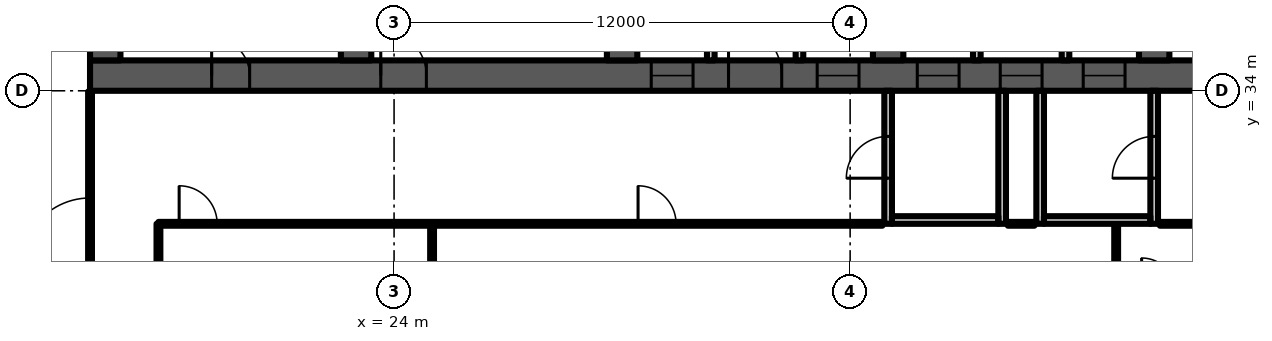
"""IFC4 building model, lengths in metres.
Left out: names, types, materials, properties, quantities, classifications, styles, units other than length and angle.
Written with IfcOpenShell. Run it as: python <this file> out.ifc"""

import sys

from ifc_helpers import new_model, si_unit, direction, frame, frame_2d, origin, place, context, subcontext, project, spatial, polyline, rectangle, outline, extrude, element, fill, save


model = new_model("IFC4")
c1 = context("Model", 3, precision=1e-05, world=origin(), true_north=direction((0.0, 1.0)))
c2 = subcontext(c1, "Body", "Model", "MODEL_VIEW")
j1 = project(units=[si_unit("LENGTHUNIT", "METRE"), si_unit("PLANEANGLEUNIT", "RADIAN")], contexts=[c1])
p1 = place(None, origin())
s1 = spatial("IfcSite", under=j1, at=p1, CompositionType="ELEMENT")
p2 = place(p1, origin())
s2 = spatial("IfcBuilding", under=s1, at=p2, CompositionType="ELEMENT")
p3 = place(p2, frame((0.0, 0.0, 151.9)))
s3 = spatial("IfcBuildingStorey", under=s2, at=p3, CompositionType="ELEMENT", Elevation=151.9)
p4 = place(p3, frame((16.0, 34.4, 0.0), z_axis=(0.0, 0.0, 1.0), x_axis=(1.0, 0.0, 0.0)))
e1 = element("IfcWall", 1, at=p4, inside=s3, PredefinedType="SHEAR", context=c2, shape_type="SweptSolid", body=[
    extrude(rectangle(XDim=42.0, YDim=0.8, at=frame_2d((21.0, 0.0))), origin(), (0.0, 0.0, 1.0), 3.6),
])
p5 = place(p4, frame((3.2, 0.0, 0.0)))
e2 = element("IfcOpeningElement", 2, at=p5, cuts=e1, PredefinedType="OPENING", context=c2, shape_type="SweptSolid", body=[
    extrude(rectangle(XDim=1.0, YDim=2.1, at=frame_2d((0.5, 1.05))), frame((0.0, 0.41, 0.0), z_axis=(0.0, -1.0, 0.0), x_axis=(1.0, 0.0, 0.0)), (0.0, 0.0, 1.0), 0.82),
])
p6 = place(p4, frame((7.65, 0.0, 0.0)))
e3 = element("IfcOpeningElement", 3, at=p6, cuts=e1, PredefinedType="OPENING", context=c2, shape_type="SweptSolid", body=[
    extrude(rectangle(XDim=1.2, YDim=2.1, at=frame_2d((0.6, 1.05))), frame((0.0, 0.41, 0.0), z_axis=(0.0, -1.0, 0.0), x_axis=(1.0, 0.0, 0.0)), (0.0, 0.0, 1.0), 0.82),
])
p7 = place(p4, frame((14.767, 0.0, 0.0)))
e4 = element("IfcOpeningElement", 4, at=p7, cuts=e1, PredefinedType="OPENING", context=c2, shape_type="SweptSolid", body=[
    extrude(rectangle(XDim=1.1, YDim=2.1, at=frame_2d((0.55, 1.05))), frame((0.0, 0.41, 0.0), z_axis=(0.0, -1.0, 0.0), x_axis=(1.0, 0.0, 0.0)), (0.0, 0.0, 1.0), 0.82),
])
p8 = place(p4, frame((19.133, 0.0, 0.0)))
e5 = element("IfcOpeningElement", 5, at=p8, cuts=e1, PredefinedType="OPENING", context=c2, shape_type="SweptSolid", body=[
    extrude(rectangle(XDim=1.1, YDim=2.1, at=frame_2d((0.55, 1.05))), frame((0.0, 0.41, 0.0), z_axis=(0.0, -1.0, 0.0), x_axis=(1.0, 0.0, 0.0)), (0.0, 0.0, 1.0), 0.82),
])
p9 = place(p4, frame((16.8, 0.0, 0.0)))
e6 = element("IfcOpeningElement", 6, at=p9, cuts=e1, PredefinedType="OPENING", context=c2, shape_type="SweptSolid", body=[
    extrude(rectangle(XDim=1.4, YDim=2.1, at=frame_2d((0.7, 1.05))), frame((0.0, 0.41, 0.0), z_axis=(0.0, -1.0, 0.0), x_axis=(1.0, 0.0, 0.0)), (0.0, 0.0, 1.0), 0.82),
])
p10 = place(p4, frame((21.767, 0.0, 0.0)))
e7 = element("IfcOpeningElement", 7, at=p10, cuts=e1, PredefinedType="OPENING", context=c2, shape_type="SweptSolid", body=[
    extrude(rectangle(XDim=1.1, YDim=2.1, at=frame_2d((0.55, 1.05))), frame((0.0, 0.41, 0.0), z_axis=(0.0, -1.0, 0.0), x_axis=(1.0, 0.0, 0.0)), (0.0, 0.0, 1.0), 0.82),
])
p11 = place(p4, frame((23.95, 0.0, 0.0)))
e8 = element("IfcOpeningElement", 8, at=p11, cuts=e1, PredefinedType="OPENING", context=c2, shape_type="SweptSolid", body=[
    extrude(rectangle(XDim=1.1, YDim=2.1, at=frame_2d((0.55, 1.05))), frame((0.0, 0.41, 0.0), z_axis=(0.0, -1.0, 0.0), x_axis=(1.0, 0.0, 0.0)), (0.0, 0.0, 1.0), 0.82),
])
p12 = place(p4, frame((26.133, 0.0, 0.0)))
e9 = element("IfcOpeningElement", 9, at=p12, cuts=e1, PredefinedType="OPENING", context=c2, shape_type="SweptSolid", body=[
    extrude(rectangle(XDim=1.1, YDim=2.1, at=frame_2d((0.55, 1.05))), frame((0.0, 0.41, 0.0), z_axis=(0.0, -1.0, 0.0), x_axis=(1.0, 0.0, 0.0)), (0.0, 0.0, 1.0), 0.82),
])
p13 = place(p4, frame((33.15, 0.0, 0.0)))
e10 = element("IfcOpeningElement", 10, at=p13, cuts=e1, PredefinedType="OPENING", context=c2, shape_type="SweptSolid", body=[
    extrude(rectangle(XDim=1.2, YDim=2.1, at=frame_2d((0.6, 1.05))), frame((0.0, 0.41, 0.0), z_axis=(0.0, -1.0, 0.0), x_axis=(1.0, 0.0, 0.0)), (0.0, 0.0, 1.0), 0.82),
])
p14 = place(p4, frame((35.817, 0.0, 0.0)))
e11 = element("IfcOpeningElement", 11, at=p14, cuts=e1, PredefinedType="OPENING", context=c2, shape_type="SweptSolid", body=[
    extrude(rectangle(XDim=1.0, YDim=2.1, at=frame_2d((0.5, 1.05))), frame((0.0, 0.41, 0.0), z_axis=(0.0, -1.0, 0.0), x_axis=(1.0, 0.0, 0.0)), (0.0, 0.0, 1.0), 0.82),
])
p15 = place(p4, frame((39.95, 0.0, 0.0)))
e12 = element("IfcOpeningElement", 12, at=p15, cuts=e1, PredefinedType="OPENING", context=c2, shape_type="SweptSolid", body=[
    extrude(rectangle(XDim=1.0, YDim=2.1, at=frame_2d((0.5, 1.05))), frame((0.0, 0.41, 0.0), z_axis=(0.0, -1.0, 0.0), x_axis=(1.0, 0.0, 0.0)), (0.0, 0.0, 1.0), 0.82),
])
p16 = place(p4, frame((37.767, 0.0, 0.0)))
e13 = element("IfcOpeningElement", 13, at=p16, cuts=e1, PredefinedType="OPENING", context=c2, shape_type="SweptSolid", body=[
    extrude(rectangle(XDim=1.4, YDim=2.1, at=frame_2d((0.7, 1.05))), frame((0.0, 0.41, 0.0), z_axis=(0.0, -1.0, 0.0), x_axis=(1.0, 0.0, 0.0)), (0.0, 0.0, 1.0), 0.82),
])
p17 = place(p3, frame((16.4, 34.8, 0.0), z_axis=(0.0, 0.0, 1.0), x_axis=(0.0, 1.0, 0.0)))
e14 = element("IfcWall", 14, at=p17, inside=s3, PredefinedType="SHEAR", context=c2, shape_type="SweptSolid", body=[
    extrude(rectangle(XDim=13.184, YDim=0.8, at=frame_2d((6.592, 0.0))), origin(), (0.0, 0.0, 1.0), 3.6),
])
p18 = place(p3, frame((23.0, 34.8, 0.0), z_axis=(0.0, 0.0, 1.0), x_axis=(0.0, 1.0, 0.0)))
e15 = element("IfcWall", 15, at=p18, inside=s3, PredefinedType="SHEAR", context=c2, shape_type="SweptSolid", body=[
    extrude(rectangle(XDim=13.762, YDim=0.8, at=frame_2d((6.881, 0.0))), origin(), (0.0, 0.0, 1.0), 3.6),
])
p19 = place(p18, frame((2.55, 0.0, 0.0)))
e16 = element("IfcOpeningElement", 16, at=p19, cuts=e15, PredefinedType="OPENING", context=c2, shape_type="SweptSolid", body=[
    extrude(rectangle(XDim=1.1, YDim=2.1, at=frame_2d((0.55, 1.05))), frame((0.0, 0.41, 0.0), z_axis=(0.0, -1.0, 0.0), x_axis=(1.0, 0.0, 0.0)), (0.0, 0.0, 1.0), 0.82),
])
p20 = place(p18, frame((10.0, 0.0, 0.0)))
e17 = element("IfcOpeningElement", 17, at=p20, cuts=e15, PredefinedType="OPENING", context=c2, shape_type="SweptSolid", body=[
    extrude(rectangle(XDim=1.0, YDim=2.1, at=frame_2d((0.5, 1.05))), frame((0.0, 0.41, 0.0), z_axis=(0.0, -1.0, 0.0), x_axis=(1.0, 0.0, 0.0)), (0.0, 0.0, 1.0), 0.82),
])
p21 = place(p3, frame((30.0, 34.8, 0.0), z_axis=(0.0, 0.0, 1.0), x_axis=(0.0, 1.0, 0.0)))
e18 = element("IfcWall", 18, at=p21, inside=s3, PredefinedType="SHEAR", context=c2, shape_type="SweptSolid", body=[
    extrude(rectangle(XDim=14.374, YDim=0.8, at=frame_2d((7.187, 0.0))), origin(), (0.0, 0.0, 1.0), 3.6),
])
p22 = place(p21, frame((3.6, 0.0, 0.0)))
e19 = element("IfcOpeningElement", 19, at=p22, cuts=e18, PredefinedType="OPENING", context=c2, shape_type="SweptSolid", body=[
    extrude(rectangle(XDim=1.1, YDim=2.1, at=frame_2d((0.55, 1.05))), frame((0.0, 0.41, 0.0), z_axis=(0.0, -1.0, 0.0), x_axis=(1.0, 0.0, 0.0)), (0.0, 0.0, 1.0), 0.82),
])
p23 = place(p3, frame((37.0, 34.8, 0.0), z_axis=(0.0, 0.0, 1.0), x_axis=(0.0, 1.0, 0.0)))
e20 = element("IfcWall", 20, at=p23, inside=s3, PredefinedType="SHEAR", context=c2, shape_type="SweptSolid", body=[
    extrude(rectangle(XDim=14.987, YDim=0.8, at=frame_2d((7.493, 0.0))), origin(), (0.0, 0.0, 1.0), 3.6),
])
p24 = place(p23, frame((11.312, 0.0, 0.0)))
e21 = element("IfcOpeningElement", 21, at=p24, cuts=e20, PredefinedType="OPENING", context=c2, shape_type="SweptSolid", body=[
    extrude(rectangle(XDim=1.0, YDim=2.1, at=frame_2d((0.5, 1.05))), frame((0.0, 0.41, 0.0), z_axis=(0.0, -1.0, 0.0), x_axis=(1.0, 0.0, 0.0)), (0.0, 0.0, 1.0), 0.82),
])
p25 = place(p23, frame((3.6, 0.0, 0.0)))
e22 = element("IfcOpeningElement", 22, at=p25, cuts=e20, PredefinedType="OPENING", context=c2, shape_type="SweptSolid", body=[
    extrude(rectangle(XDim=1.1, YDim=2.1, at=frame_2d((0.55, 1.05))), frame((0.0, 0.41, 0.0), z_axis=(0.0, -1.0, 0.0), x_axis=(1.0, 0.0, 0.0)), (0.0, 0.0, 1.0), 0.82),
])
p26 = place(p3, frame((44.0, 34.8, 0.0), z_axis=(0.0, 0.0, 1.0), x_axis=(0.0, 1.0, 0.0)))
e23 = element("IfcWall", 23, at=p26, inside=s3, PredefinedType="SHEAR", context=c2, shape_type="SweptSolid", body=[
    extrude(rectangle(XDim=14.374, YDim=0.8, at=frame_2d((7.187, 0.0))), origin(), (0.0, 0.0, 1.0), 3.6),
])
p27 = place(p26, frame((11.312, 0.0, 0.0)))
e24 = element("IfcOpeningElement", 24, at=p27, cuts=e23, PredefinedType="OPENING", context=c2, shape_type="SweptSolid", body=[
    extrude(rectangle(XDim=1.0, YDim=2.1, at=frame_2d((0.5, 1.05))), frame((0.0, 0.41, 0.0), z_axis=(0.0, -1.0, 0.0), x_axis=(1.0, 0.0, 0.0)), (0.0, 0.0, 1.0), 0.82),
])
p28 = place(p26, frame((3.6, 0.0, 0.0)))
e25 = element("IfcOpeningElement", 25, at=p28, cuts=e23, PredefinedType="OPENING", context=c2, shape_type="SweptSolid", body=[
    extrude(rectangle(XDim=1.1, YDim=2.1, at=frame_2d((0.55, 1.05))), frame((0.0, 0.41, 0.0), z_axis=(0.0, -1.0, 0.0), x_axis=(1.0, 0.0, 0.0)), (0.0, 0.0, 1.0), 0.82),
])
p29 = place(p3, origin())
e26 = element("IfcWall", 26, at=p29, inside=s3, PredefinedType="PARTITIONING", context=c2, shape_type="SweptSolid", body=[
    extrude(outline(polyline([(32.233, 37.65), (30.4, 37.65), (30.4, 37.85), (32.233, 37.85), (32.433, 37.85), (32.433, 34.8), (32.233, 34.8), (32.233, 37.65)])), origin(), (0.0, 0.0, 1.0), 3.2),
])
p30 = place(p3, origin())
e27 = element("IfcWall", 27, at=p30, inside=s3, PredefinedType="PARTITIONING", context=c2, shape_type="SweptSolid", body=[
    extrude(outline(polyline([(34.567, 37.85), (34.767, 37.85), (36.6, 37.85), (36.6, 37.65), (34.767, 37.65), (34.767, 34.8), (34.567, 34.8), (34.567, 37.85)])), origin(), (0.0, 0.0, 1.0), 3.2),
])
p31 = place(p3, origin())
e28 = element("IfcWall", 28, at=p31, inside=s3, PredefinedType="PARTITIONING", context=c2, shape_type="SweptSolid", body=[
    extrude(outline(polyline([(41.567, 37.1), (39.433, 37.1), (39.433, 34.8), (39.233, 34.8), (39.233, 37.65), (37.4, 37.65), (37.4, 37.85), (39.233, 37.85), (39.433, 37.85), (39.433, 37.3), (41.567, 37.3), (41.567, 37.55), (41.767, 37.55), (43.6, 37.55), (43.6, 37.35), (41.767, 37.35), (41.767, 34.8), (41.567, 34.8), (41.567, 37.1)])), origin(), (0.0, 0.0, 1.0), 3.2),
])
p32 = place(p3, frame((37.0, 30.5, 0.0), z_axis=(0.0, 0.0, 1.0), x_axis=(0.0, 1.0, 0.0)))
e29 = element("IfcWall", 29, at=p32, inside=s3, PredefinedType="PARTITIONING", context=c2, shape_type="SweptSolid", body=[
    extrude(rectangle(XDim=3.5, YDim=0.2, at=frame_2d((1.75, 0.0))), origin(), (0.0, 0.0, 1.0), 3.2),
])
p33 = place(p32, frame((1.2, 0.0, 0.0)))
e30 = element("IfcOpeningElement", 30, at=p33, cuts=e29, PredefinedType="OPENING", context=c2, shape_type="SweptSolid", body=[
    extrude(rectangle(XDim=1.1, YDim=2.1, at=frame_2d((0.55, 1.05))), frame((0.0, 0.11, 0.0), z_axis=(0.0, -1.0, 0.0), x_axis=(1.0, 0.0, 0.0)), (0.0, 0.0, 1.0), 0.22),
])
p34 = place(p3, frame((40.0, 30.5, 0.0), z_axis=(0.0, 0.0, 1.0), x_axis=(0.0, 1.0, 0.0)))
e31 = element("IfcWall", 31, at=p34, inside=s3, PredefinedType="PARTITIONING", context=c2, shape_type="SweptSolid", body=[
    extrude(rectangle(XDim=3.5, YDim=0.2, at=frame_2d((1.75, 0.0))), origin(), (0.0, 0.0, 1.0), 3.2),
])
p35 = place(p3, frame((37.1, 30.6, 0.0), z_axis=(0.0, 0.0, 1.0), x_axis=(1.0, 0.0, 0.0)))
e32 = element("IfcWall", 32, at=p35, inside=s3, PredefinedType="PARTITIONING", context=c2, shape_type="SweptSolid", body=[
    extrude(rectangle(XDim=2.8, YDim=0.2, at=frame_2d((1.4, 0.0))), origin(), (0.0, 0.0, 1.0), 3.2),
])
p36 = place(p3, frame((41.0, 30.5, 0.0), z_axis=(0.0, 0.0, 1.0), x_axis=(0.0, 1.0, 0.0)))
e33 = element("IfcWall", 33, at=p36, inside=s3, PredefinedType="PARTITIONING", context=c2, shape_type="SweptSolid", body=[
    extrude(rectangle(XDim=3.5, YDim=0.2, at=frame_2d((1.75, 0.0))), origin(), (0.0, 0.0, 1.0), 3.2),
])
p37 = place(p3, frame((44.0, 30.5, 0.0), z_axis=(0.0, 0.0, 1.0), x_axis=(0.0, 1.0, 0.0)))
e34 = element("IfcWall", 34, at=p37, inside=s3, PredefinedType="PARTITIONING", context=c2, shape_type="SweptSolid", body=[
    extrude(rectangle(XDim=3.5, YDim=0.2, at=frame_2d((1.75, 0.0))), origin(), (0.0, 0.0, 1.0), 3.2),
])
p38 = place(p37, frame((1.2, 0.0, 0.0)))
e35 = element("IfcOpeningElement", 35, at=p38, cuts=e34, PredefinedType="OPENING", context=c2, shape_type="SweptSolid", body=[
    extrude(rectangle(XDim=1.1, YDim=2.1, at=frame_2d((0.55, 1.05))), frame((0.0, 0.11, 0.0), z_axis=(0.0, -1.0, 0.0), x_axis=(1.0, 0.0, 0.0)), (0.0, 0.0, 1.0), 0.22),
])
p39 = place(p3, frame((41.1, 30.6, 0.0), z_axis=(0.0, 0.0, 1.0), x_axis=(1.0, 0.0, 0.0)))
e36 = element("IfcWall", 36, at=p39, inside=s3, PredefinedType="PARTITIONING", context=c2, shape_type="SweptSolid", body=[
    extrude(rectangle(XDim=2.8, YDim=0.2, at=frame_2d((1.4, 0.0))), origin(), (0.0, 0.0, 1.0), 3.2),
])
p40 = place(p3, frame((16.0, 26.42, 0.0), z_axis=(0.0, 0.0, 1.0), x_axis=(0.0, 1.0, 0.0)))
e37 = element("IfcWall", 37, at=p40, inside=s3, PredefinedType="PARTITIONING", context=c2, shape_type="SweptSolid", body=[
    extrude(rectangle(XDim=7.56, YDim=0.1, at=frame_2d((3.78, 0.0))), origin(), (0.0, 0.0, 1.0), 3.2),
])
p41 = place(p40, frame((2.96, 0.0, 0.0)))
e38 = element("IfcOpeningElement", 38, at=p41, cuts=e37, PredefinedType="OPENING", context=c2, shape_type="SweptSolid", body=[
    extrude(rectangle(XDim=1.8, YDim=2.1, at=frame_2d((0.9, 1.05))), frame((0.0, 0.06, 0.0), z_axis=(0.0, -1.0, 0.0), x_axis=(1.0, 0.0, 0.0)), (0.0, 0.0, 1.0), 0.12),
])
p42 = place(p3, frame((17.8, 24.135, 0.0), z_axis=(0.0, 0.0, 1.0), x_axis=(0.0, 1.0, 0.0)))
e39 = element("IfcWall", 39, at=p42, inside=s3, PredefinedType="PARTITIONING", context=c2, shape_type="SweptSolid", body=[
    extrude(rectangle(XDim=6.365, YDim=0.1, at=frame_2d((3.183, 0.0))), origin(), (0.0, 0.0, 1.0), 3.2),
])
p43 = place(p3, frame((17.8, 30.5, 0.0), z_axis=(0.0, 0.0, 1.0), x_axis=(1.0, 0.0, 0.0)))
e40 = element("IfcWall", 40, at=p43, inside=s3, PredefinedType="PARTITIONING", context=c2, shape_type="SweptSolid", body=[
    extrude(rectangle(XDim=19.05, YDim=0.1, at=frame_2d((9.525, 0.0))), origin(), (0.0, 0.0, 1.0), 3.2),
])
p44 = place(p43, frame((0.545, 0.0, 0.0)))
e41 = element("IfcOpeningElement", 41, at=p44, cuts=e40, PredefinedType="OPENING", context=c2, shape_type="SweptSolid", body=[
    extrude(rectangle(XDim=1.0, YDim=2.1, at=frame_2d((0.5, 1.05))), frame((0.0, 0.06, 0.0), z_axis=(0.0, -1.0, 0.0), x_axis=(1.0, 0.0, 0.0)), (0.0, 0.0, 1.0), 0.12),
])
p45 = place(p43, frame((12.62, 0.0, 0.0)))
e42 = element("IfcOpeningElement", 42, at=p45, cuts=e40, PredefinedType="OPENING", context=c2, shape_type="SweptSolid", body=[
    extrude(rectangle(XDim=1.0, YDim=2.1, at=frame_2d((0.5, 1.05))), frame((0.0, 0.06, 0.0), z_axis=(0.0, -1.0, 0.0), x_axis=(1.0, 0.0, 0.0)), (0.0, 0.0, 1.0), 0.12),
])
p46 = place(p3, frame((25.0, 15.27, 0.0), z_axis=(0.0, 0.0, 1.0), x_axis=(0.0, 1.0, 0.0)))
e43 = element("IfcWall", 43, at=p46, inside=s3, PredefinedType="PARTITIONING", context=c2, shape_type="SweptSolid", body=[
    extrude(rectangle(XDim=15.23, YDim=0.1, at=frame_2d((7.615, 0.0))), origin(), (0.0, 0.0, 1.0), 3.2),
])
p47 = place(p3, frame((43.0, 15.27, 0.0), z_axis=(0.0, 0.0, 1.0), x_axis=(0.0, 1.0, 0.0)))
e44 = element("IfcWall", 44, at=p47, inside=s3, PredefinedType="PARTITIONING", context=c2, shape_type="SweptSolid", body=[
    extrude(rectangle(XDim=15.22, YDim=0.1, at=frame_2d((7.61, 0.0))), origin(), (0.0, 0.0, 1.0), 3.2),
])
p48 = place(p3, frame((40.15, 30.5, 0.0), z_axis=(0.0, 0.0, 1.0), x_axis=(1.0, 0.0, 0.0)))
e45 = element("IfcWall", 45, at=p48, inside=s3, PredefinedType="PARTITIONING", context=c2, shape_type="SweptSolid", body=[
    extrude(rectangle(XDim=0.7, YDim=0.1, at=frame_2d((0.35, 0.0))), origin(), (0.0, 0.0, 1.0), 3.2),
])
p49 = place(p3, frame((44.15, 30.5, 0.0), z_axis=(0.0, 0.0, 1.0), x_axis=(1.0, 0.0, 0.0)))
e46 = element("IfcWall", 46, at=p49, inside=s3, PredefinedType="PARTITIONING", context=c2, shape_type="SweptSolid", body=[
    extrude(rectangle(XDim=12.425, YDim=0.1, at=frame_2d((6.212, 0.0))), origin(), (0.0, 0.0, 1.0), 3.2),
])
p50 = place(p49, frame((11.15, 0.0, 0.0)))
e47 = element("IfcOpeningElement", 47, at=p50, cuts=e46, PredefinedType="OPENING", context=c2, shape_type="SweptSolid", body=[
    extrude(rectangle(XDim=1.0, YDim=2.1, at=frame_2d((0.5, 1.05))), frame((0.0, 0.06, 0.0), z_axis=(0.0, -1.0, 0.0), x_axis=(1.0, 0.0, 0.0)), (0.0, 0.0, 1.0), 0.12),
])
p51 = place(p5, origin())
e48 = element("IfcDoor", 48, at=p51, inside=s3, OperationType="SINGLE_SWING_LEFT", PredefinedType="DOOR", context=c2, shape_type="SweptSolid", body=[
    extrude(rectangle(XDim=1.0, YDim=2.1, at=frame_2d((0.5, 1.05))), frame((0.0, 0.4, 0.0), z_axis=(0.0, -1.0, 0.0), x_axis=(1.0, 0.0, 0.0)), (0.0, 0.0, 1.0), 0.8),
])
fill(e2, e48)
p52 = place(p6, origin())
e49 = element("IfcDoor", 49, at=p52, inside=s3, OperationType="SINGLE_SWING_LEFT", PredefinedType="DOOR", context=c2, shape_type="SweptSolid", body=[
    extrude(rectangle(XDim=1.2, YDim=2.1, at=frame_2d((0.6, 1.05))), frame((0.0, 0.025, 0.0), z_axis=(0.0, -1.0, 0.0), x_axis=(1.0, 0.0, 0.0)), (0.0, 0.0, 1.0), 0.05),
])
fill(e3, e49)
p53 = place(p7, origin())
e50 = element("IfcDoor", 50, at=p53, inside=s3, OperationType="DOUBLE_DOOR_SLIDING", PredefinedType="DOOR", context=c2, shape_type="SweptSolid", body=[
    extrude(rectangle(XDim=1.1, YDim=2.1, at=frame_2d((0.55, 1.05))), frame((0.0, 0.025, 0.0), z_axis=(0.0, -1.0, 0.0), x_axis=(1.0, 0.0, 0.0)), (0.0, 0.0, 1.0), 0.05),
])
fill(e4, e50)
p54 = place(p8, origin())
e51 = element("IfcDoor", 51, at=p54, inside=s3, OperationType="DOUBLE_DOOR_SLIDING", PredefinedType="DOOR", context=c2, shape_type="SweptSolid", body=[
    extrude(rectangle(XDim=1.1, YDim=2.1, at=frame_2d((0.55, 1.05))), frame((0.0, 0.025, 0.0), z_axis=(0.0, -1.0, 0.0), x_axis=(1.0, 0.0, 0.0)), (0.0, 0.0, 1.0), 0.05),
])
fill(e5, e51)
p55 = place(p9, origin())
e52 = element("IfcDoor", 52, at=p55, inside=s3, OperationType="DOUBLE_DOOR_SINGLE_SWING", PredefinedType="DOOR", context=c2, shape_type="SweptSolid", body=[
    extrude(rectangle(XDim=1.4, YDim=2.1, at=frame_2d((0.7, 1.05))), frame((0.0, 0.025, 0.0), z_axis=(0.0, -1.0, 0.0), x_axis=(1.0, 0.0, 0.0)), (0.0, 0.0, 1.0), 0.05),
])
fill(e6, e52)
p56 = place(p10, origin())
e53 = element("IfcDoor", 53, at=p56, inside=s3, OperationType="DOUBLE_DOOR_SLIDING", PredefinedType="DOOR", context=c2, shape_type="SweptSolid", body=[
    extrude(rectangle(XDim=1.1, YDim=2.1, at=frame_2d((0.55, 1.05))), frame((0.0, 0.025, 0.0), z_axis=(0.0, -1.0, 0.0), x_axis=(1.0, 0.0, 0.0)), (0.0, 0.0, 1.0), 0.05),
])
fill(e7, e53)
p57 = place(p11, origin())
e54 = element("IfcDoor", 54, at=p57, inside=s3, OperationType="DOUBLE_DOOR_SLIDING", PredefinedType="DOOR", context=c2, shape_type="SweptSolid", body=[
    extrude(rectangle(XDim=1.1, YDim=2.1, at=frame_2d((0.55, 1.05))), frame((0.0, 0.025, 0.0), z_axis=(0.0, -1.0, 0.0), x_axis=(1.0, 0.0, 0.0)), (0.0, 0.0, 1.0), 0.05),
])
fill(e8, e54)
p58 = place(p12, origin())
e55 = element("IfcDoor", 55, at=p58, inside=s3, OperationType="DOUBLE_DOOR_SLIDING", PredefinedType="DOOR", context=c2, shape_type="SweptSolid", body=[
    extrude(rectangle(XDim=1.1, YDim=2.1, at=frame_2d((0.55, 1.05))), frame((0.0, 0.025, 0.0), z_axis=(0.0, -1.0, 0.0), x_axis=(1.0, 0.0, 0.0)), (0.0, 0.0, 1.0), 0.05),
])
fill(e9, e55)
p59 = place(p33, origin())
e56 = element("IfcDoor", 56, at=p59, inside=s3, OperationType="SINGLE_SWING_LEFT", PredefinedType="DOOR", context=c2, shape_type="SweptSolid", body=[
    extrude(rectangle(XDim=1.1, YDim=2.1, at=frame_2d((0.55, 1.05))), frame((0.0, 0.025, 0.0), z_axis=(0.0, -1.0, 0.0), x_axis=(1.0, 0.0, 0.0)), (0.0, 0.0, 1.0), 0.05),
])
fill(e30, e56)
p60 = place(p38, origin())
e57 = element("IfcDoor", 57, at=p60, inside=s3, OperationType="SINGLE_SWING_LEFT", PredefinedType="DOOR", context=c2, shape_type="SweptSolid", body=[
    extrude(rectangle(XDim=1.1, YDim=2.1, at=frame_2d((0.55, 1.05))), frame((0.0, 0.025, 0.0), z_axis=(0.0, -1.0, 0.0), x_axis=(1.0, 0.0, 0.0)), (0.0, 0.0, 1.0), 0.05),
])
fill(e35, e57)
p61 = place(p41, origin())
e58 = element("IfcDoor", 58, at=p61, inside=s3, OperationType="DOUBLE_DOOR_SINGLE_SWING", PredefinedType="DOOR", context=c2, shape_type="SweptSolid", body=[
    extrude(rectangle(XDim=1.8, YDim=2.1, at=frame_2d((0.9, 1.05))), frame((0.0, 0.025, 0.0), z_axis=(0.0, -1.0, 0.0), x_axis=(1.0, 0.0, 0.0)), (0.0, 0.0, 1.0), 0.05),
])
fill(e38, e58)
p62 = place(p44, origin())
e59 = element("IfcDoor", 59, at=p62, inside=s3, OperationType="SINGLE_SWING_LEFT", PredefinedType="DOOR", context=c2, shape_type="SweptSolid", body=[
    extrude(rectangle(XDim=1.0, YDim=2.1, at=frame_2d((0.5, 1.05))), frame((0.0, 0.025, 0.0), z_axis=(0.0, -1.0, 0.0), x_axis=(1.0, 0.0, 0.0)), (0.0, 0.0, 1.0), 0.05),
])
fill(e41, e59)
p63 = place(p45, origin())
e60 = element("IfcDoor", 60, at=p63, inside=s3, OperationType="SINGLE_SWING_LEFT", PredefinedType="DOOR", context=c2, shape_type="SweptSolid", body=[
    extrude(rectangle(XDim=1.0, YDim=2.1, at=frame_2d((0.5, 1.05))), frame((0.0, 0.025, 0.0), z_axis=(0.0, -1.0, 0.0), x_axis=(1.0, 0.0, 0.0)), (0.0, 0.0, 1.0), 0.05),
])
fill(e42, e60)
save(model, sys.argv[1])
